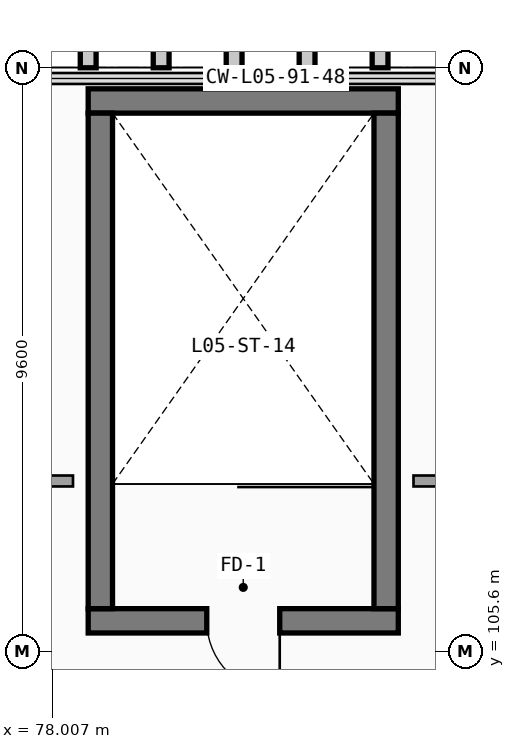
"""IFC4 building model, lengths in metres.
Left out: names, types, materials, properties, quantities, classifications, styles, units other than length and angle.
Written with IfcOpenShell. Run it as: python <this file> out.ifc"""

import sys

from ifc_helpers import new_model, si_unit, direction, frame, frame_2d, origin, place, context, subcontext, project, spatial, rectangle, extrude, element, fill, save


model = new_model("IFC4")
c1 = context("Model", 3, precision=1e-05, world=origin(), true_north=direction((0.0, 1.0)))
c2 = subcontext(c1, "Body", "Model", "MODEL_VIEW")
j1 = project(units=[si_unit("LENGTHUNIT", "METRE"), si_unit("PLANEANGLEUNIT", "RADIAN")], contexts=[c1])
p1 = place(None, origin())
s1 = spatial("IfcSite", under=j1, at=p1, CompositionType="ELEMENT")
p2 = place(p1, origin())
s2 = spatial("IfcBuilding", under=s1, at=p2, CompositionType="ELEMENT")
p3 = place(p2, frame((0.0, 0.0, 23.1)))
s3 = spatial("IfcBuildingStorey", under=s2, at=p3, CompositionType="ELEMENT", Elevation=23.1)
p4 = place(p3, frame((78.6, 106.1, 0.0), z_axis=(0.0, 0.0, 1.0), x_axis=(1.0, 0.0, 0.0)))
e1 = element("IfcWall", 1, at=p4, inside=s3, PredefinedType="SHEAR", context=c2, shape_type="SweptSolid", body=[
    extrude(rectangle(XDim=5.1, YDim=0.4, at=frame_2d((2.55, 0.0))), origin(), (0.0, 0.0, 1.0), 4.82),
])
p5 = place(p4, frame((3.15, 0.0, 0.0), z_axis=(0.0, 0.0, 1.0), x_axis=(-1.0, 0.0, 0.0)))
e2 = element("IfcOpeningElement", 2, at=p5, cuts=e1, PredefinedType="OPENING", context=c2, shape_type="SweptSolid", body=[
    extrude(rectangle(XDim=1.2, YDim=2.2, at=frame_2d((0.6, 1.1))), frame((0.0, 0.21, 0.0), z_axis=(0.0, -1.0, 0.0), x_axis=(1.0, 0.0, 0.0)), (0.0, 0.0, 1.0), 0.42),
])
p6 = place(p3, frame((83.7, 114.65, 0.0), z_axis=(0.0, 0.0, 1.0), x_axis=(-1.0, 0.0, 0.0)))
e3 = element("IfcWall", 3, at=p6, inside=s3, PredefinedType="SHEAR", context=c2, shape_type="SweptSolid", body=[
    extrude(rectangle(XDim=5.1, YDim=0.4, at=frame_2d((2.55, 0.0))), origin(), (0.0, 0.0, 1.0), 4.82),
])
for number, where, z_axis, x_axis in (
    (4, (78.8, 114.45, 0.0), (0.0, 0.0, 1.0), (0.0, -1.0, 0.0)),
    (5, (83.5, 106.3, 0.0), (0.0, 0.0, 1.0), (0.0, 1.0, 0.0)),
):
    element("IfcWall", number, at=place(p3, frame(where, z_axis=z_axis, x_axis=x_axis)), inside=s3, PredefinedType="SHEAR", context=c2, shape_type="SweptSolid", body=[
        extrude(rectangle(XDim=8.15, YDim=0.4, at=frame_2d((4.075, 0.0))), origin(), (0.0, 0.0, 1.0), 4.82),
    ])
p7 = place(p3, frame((76.0, 108.4, 0.0), z_axis=(0.0, 0.0, 1.0), x_axis=(1.0, 0.0, 0.0)))
e6 = element("IfcWall", 6, at=p7, inside=s3, PredefinedType="PARTITIONING", context=c2, shape_type="SweptSolid", body=[
    extrude(rectangle(XDim=2.35, YDim=0.18, at=frame_2d((1.175, 0.0))), origin(), (0.0, 0.0, 1.0), 4.82),
])
p8 = place(p3, frame((83.95, 108.4, 0.0), z_axis=(0.0, 0.0, 1.0), x_axis=(1.0, 0.0, 0.0)))
e7 = element("IfcWall", 7, at=p8, inside=s3, PredefinedType="PARTITIONING", context=c2, shape_type="SweptSolid", body=[
    extrude(rectangle(XDim=3.67, YDim=0.18, at=frame_2d((1.835, 0.0))), origin(), (0.0, 0.0, 1.0), 4.82),
])
p9 = place(p5, origin())
e8 = element("IfcDoor", 8, at=p9, inside=s3, OperationType="SINGLE_SWING_LEFT", PredefinedType="DOOR", context=c2, shape_type="SweptSolid", body=[
    extrude(rectangle(XDim=1.2, YDim=2.2, at=frame_2d((0.6, 1.1))), frame((0.0, 0.025, 0.0), z_axis=(0.0, -1.0, 0.0), x_axis=(1.0, 0.0, 0.0)), (0.0, 0.0, 1.0), 0.05),
])
fill(e2, e8)
save(model, sys.argv[1])
